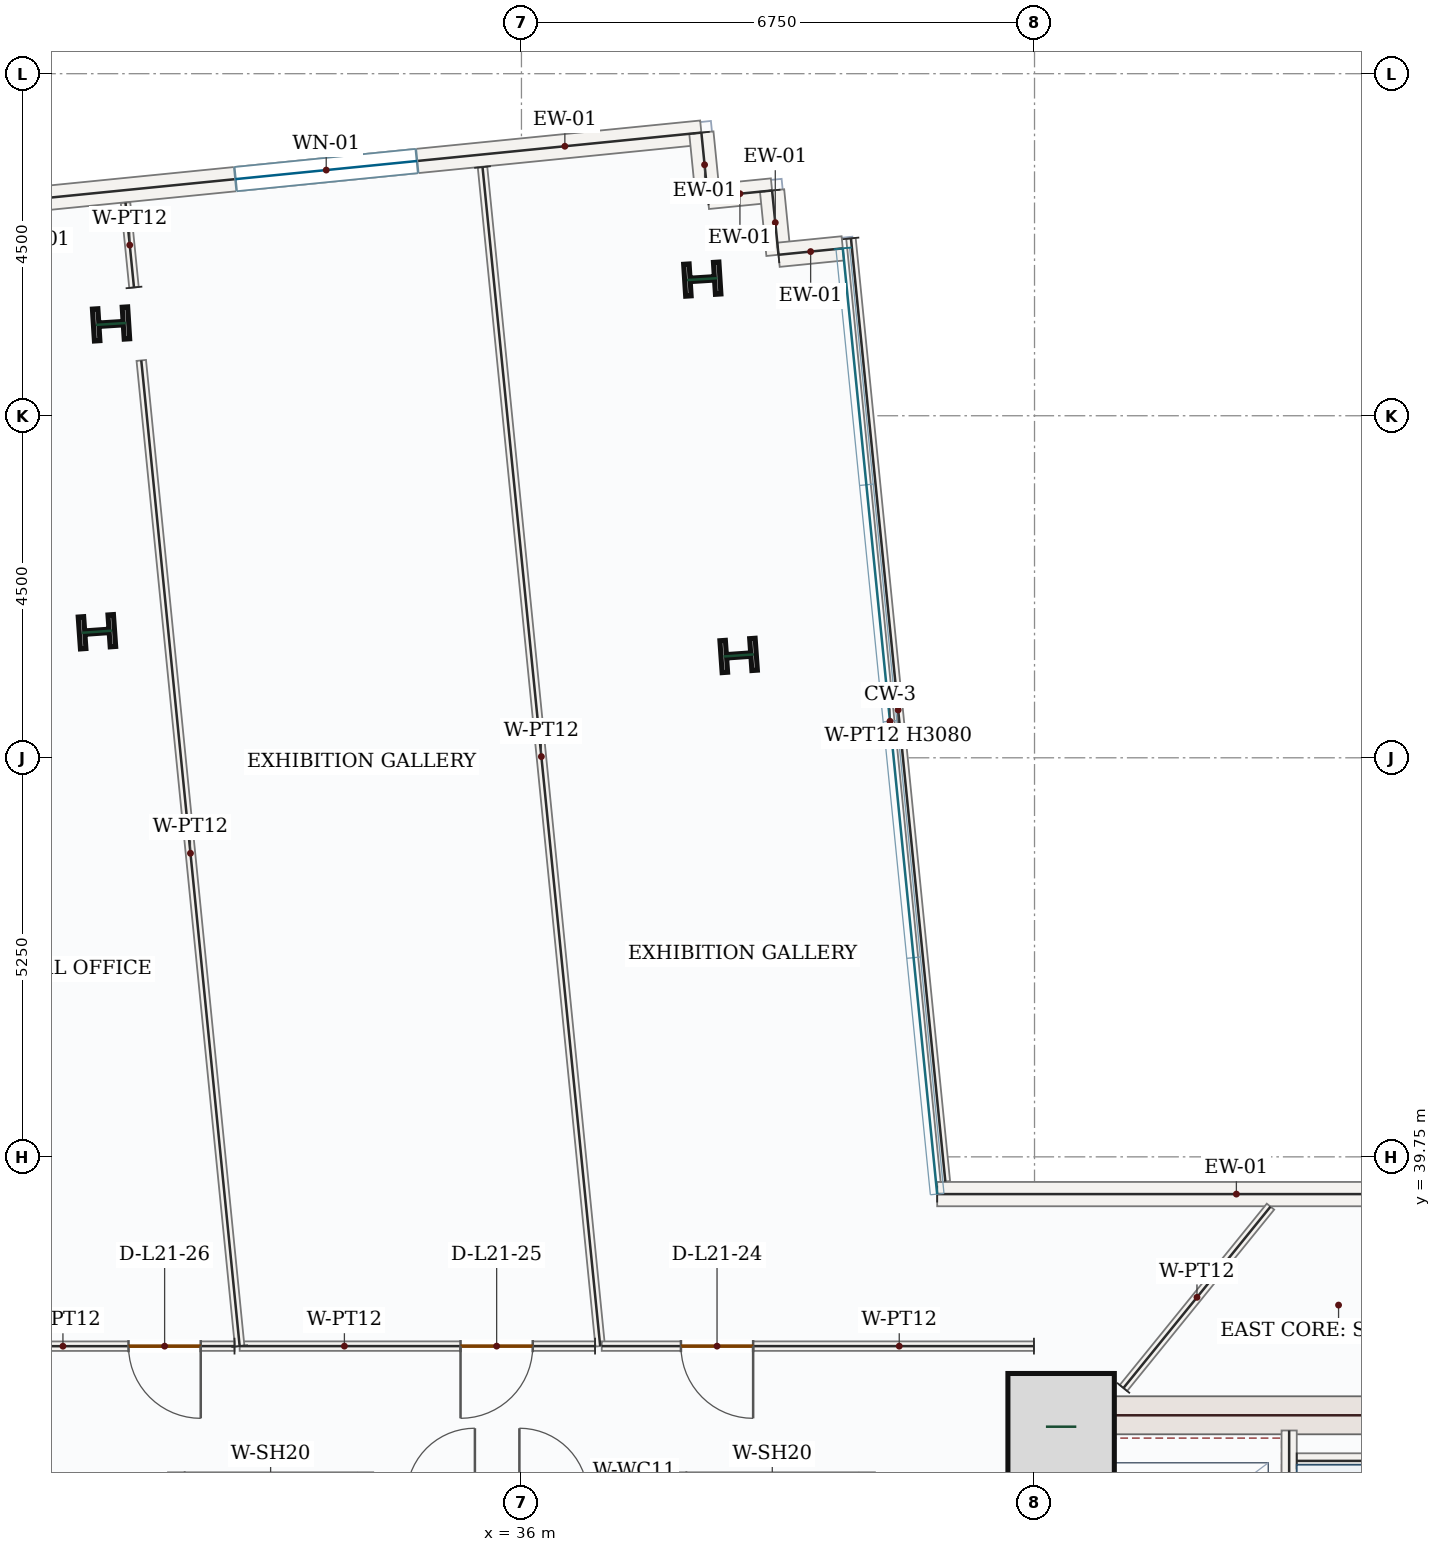
"""IFC4 building model, lengths in metres.
Left out: names, types, materials, properties, quantities, classifications, styles, units other than length and angle.
Written with IfcOpenShell. Run it as: python <this file> out.ifc"""

import sys

from ifc_helpers import new_model, si_unit, direction, frame, frame_2d, origin, origin_2d, place, context, subcontext, project, spatial, rectangle, i_section, extrude, source, transform, mapped, element, fill, save


model = new_model("IFC4")
c1 = context("Model", 3, precision=1e-05, world=origin(), true_north=direction((0.0, 1.0)))
c2 = subcontext(c1, "Body", "Model", "MODEL_VIEW")
j1 = project(units=[si_unit("LENGTHUNIT", "METRE"), si_unit("PLANEANGLEUNIT", "RADIAN")], contexts=[c1])
p1 = place(None, origin())
s1 = spatial("IfcSite", under=j1, at=p1, CompositionType="ELEMENT")
p2 = place(p1, origin())
s2 = spatial("IfcBuilding", under=s1, at=p2, CompositionType="ELEMENT")
p3 = place(p2, frame((0.0, 0.0, 96.3)))
s3 = spatial("IfcBuildingStorey", under=s2, at=p3, CompositionType="ELEMENT", Elevation=96.3)
p4 = place(p3, frame((43.0, 28.05, 0.0), z_axis=(0.0, 0.0, 1.0), x_axis=(0.0, 1.0, 0.0)))
e1 = element("IfcWall", 1, at=p4, inside=s3, PredefinedType="SHEAR", context=c2, shape_type="SweptSolid", body=[
    extrude(rectangle(XDim=8.55, YDim=0.5, at=frame_2d((4.275, 0.0))), origin(), (0.0, 0.0, 1.0), 3.95),
])
p5 = place(p4, frame((1.5, 0.0, 0.0)))
e2 = element("IfcOpeningElement", 2, at=p5, cuts=e1, PredefinedType="OPENING", context=c2, shape_type="SweptSolid", body=[
    extrude(rectangle(XDim=1.1, YDim=2.2, at=frame_2d((0.55, 1.1))), frame((0.0, 0.26, 0.0), z_axis=(0.0, -1.0, 0.0), x_axis=(1.0, 0.0, 0.0)), (0.0, 0.0, 1.0), 0.52),
])
m1 = source(origin(), c2, "Body", "SweptSolid", [
    extrude(rectangle(XDim=7.0, YDim=0.5, at=frame_2d((3.5, 0.0))), origin(), (0.0, 0.0, 1.0), 3.95),
])
p6 = place(p3, frame((43.25, 36.35, 0.0), z_axis=(0.0, 0.0, 1.0), x_axis=(1.0, 0.0, 0.0)))
e3 = element("IfcWall", 3, at=p6, inside=s3, PredefinedType="SHEAR", context=c2, shape_type="MappedRepresentation", body=[
    mapped(m1, transform((0.0, 0.0, 0.0), x_axis=(1.0, 0.0, 0.0), y_axis=(0.0, 1.0, 0.0), z_axis=(0.0, 0.0, 1.0), scale=1.0)),
])
m2 = source(origin(), c2, "Body", "SweptSolid", [
    extrude(rectangle(XDim=1.4, YDim=1.4, at=origin_2d()), origin(), (0.0, 0.0, 1.0), 4.2),
])
p7 = place(p3, frame((43.1, 36.2, 0.0), z_axis=(0.0, 0.0, 1.0), x_axis=(1.0, 0.0, 0.0)))
e4 = element("IfcColumn", 4, at=p7, inside=s3, PredefinedType="COLUMN", context=c2, shape_type="MappedRepresentation", body=[
    mapped(m2, transform((0.0, 0.0, 0.0), x_axis=(1.0, 0.0, 0.0), y_axis=(0.0, 1.0, 0.0), z_axis=(0.0, 0.0, 1.0), scale=1.0)),
])
m3 = source(origin(), c2, "Body", "SweptSolid", [
    extrude(i_section(OverallWidth=0.421, OverallDepth=0.465, WebThickness=0.045, FlangeThickness=0.073, FilletRadius=0.018, at=origin_2d()), origin(), (0.0, 0.0, 1.0), 4.2),
])
for number, where, z_axis, x_axis in (
    (5, (38.857, 46.346, 0.0), (0.0, 0.0, 1.0), (-0.07, 0.998, 0.0)),
    (6, (30.415, 46.658, 0.0), (0.0, 0.0, 1.0), (-0.07, 0.998, 0.0)),
    (7, (38.379, 51.297, 0.0), (0.0, 0.0, 1.0), (-0.063, 0.998, 0.0)),
    (8, (30.601, 50.708, 0.0), (0.0, 0.0, 1.0), (-0.063, 0.998, 0.0)),
):
    element("IfcColumn", number, at=place(p3, frame(where, z_axis=z_axis, x_axis=x_axis)), inside=s3, PredefinedType="COLUMN", context=c2, shape_type="MappedRepresentation", body=[
        mapped(m3, transform((0.0, 0.0, 0.0), x_axis=(1.0, 0.0, 0.0), y_axis=(0.0, 1.0, 0.0), z_axis=(0.0, 0.0, 1.0), scale=1.0)),
    ])
p8 = place(p3, frame((28.496, 52.24, 0.0), z_axis=(0.0, 0.0, 1.0), x_axis=(0.995054718915, 0.09932827576, 0.0)))
e9 = element("IfcWall", 9, at=p8, inside=s3, PredefinedType="SOLIDWALL", context=c2, shape_type="SweptSolid", body=[
    extrude(rectangle(XDim=9.92, YDim=0.32, at=frame_2d((4.96, 0.0))), origin(), (0.0, 0.0, 1.0), 3.95),
])
p9 = place(p8, frame((3.76, 0.0, 0.85)))
e10 = element("IfcOpeningElement", 10, at=p9, cuts=e9, PredefinedType="OPENING", context=c2, shape_type="SweptSolid", body=[
    extrude(rectangle(XDim=2.4, YDim=1.8, at=frame_2d((1.2, 0.9))), frame((0.0, 0.17, 0.0), z_axis=(0.0, -1.0, 0.0), x_axis=(1.0, 0.0, 0.0)), (0.0, 0.0, 1.0), 0.34),
])
m4 = source(origin(), c2, "Body", "SweptSolid", [
    extrude(rectangle(XDim=0.85, YDim=0.32, at=frame_2d((0.425, 0.0))), origin(), (0.0, 0.0, 1.0), 3.95),
])
for number, where, z_axis, x_axis in (
    (11, (38.367, 53.225, 0.0), (0.0, 0.0, 1.0), (0.099, -0.995, 0.0)),
    (12, (38.451, 52.379, 0.0), (0.0, 0.0, 1.0), (0.995, 0.099, 0.0)),
):
    element("IfcWall", number, at=place(p3, frame(where, z_axis=z_axis, x_axis=x_axis)), inside=s3, PredefinedType="SOLIDWALL", context=c2, shape_type="MappedRepresentation", body=[
        mapped(m4, transform((0.0, 0.0, 0.0), x_axis=(1.0, 0.0, 0.0), y_axis=(0.0, 1.0, 0.0), z_axis=(0.0, 0.0, 1.0), scale=1.0)),
    ])
m5 = source(origin(), c2, "Body", "SweptSolid", [
    extrude(rectangle(XDim=0.85, YDim=0.32, at=frame_2d((0.425, 0.0))), origin(), (0.0, 0.0, 1.0), 3.95),
])
p10 = place(p3, frame((39.297, 52.463, 0.0), z_axis=(0.0, 0.0, 1.0), x_axis=(0.099105525559, -0.995076929088, 0.0)))
e13 = element("IfcWall", 13, at=p10, inside=s3, PredefinedType="SOLIDWALL", context=c2, shape_type="MappedRepresentation", body=[
    mapped(m5, transform((0.0, 0.0, 0.0), x_axis=(1.0, 0.0, 0.0), y_axis=(0.0, 1.0, 0.0), z_axis=(0.0, 0.0, 1.0), scale=1.0)),
])
p11 = place(p3, frame((39.382, 51.618, 0.0), z_axis=(0.0, 0.0, 1.0), x_axis=(0.995079749343, 0.09907720448, 0.0)))
e14 = element("IfcWall", 14, at=p11, inside=s3, PredefinedType="SOLIDWALL", context=c2, shape_type="MappedRepresentation", body=[
    mapped(m4, transform((0.0, 0.0, 0.0), x_axis=(1.0, 0.0, 0.0), y_axis=(0.0, 1.0, 0.0), z_axis=(0.0, 0.0, 1.0), scale=1.0)),
])
m6 = source(origin(), c2, "Body", "SweptSolid", [
    extrude(rectangle(XDim=7.873, YDim=0.32, at=frame_2d((3.936, 0.0))), origin(), (0.0, 0.0, 1.0), 3.95),
])
p12 = place(p3, frame((41.469, 39.26, 0.0), z_axis=(0.0, 0.0, 1.0), x_axis=(1.0, 0.0, 0.0)))
e15 = element("IfcWall", 15, at=p12, inside=s3, PredefinedType="SOLIDWALL", context=c2, shape_type="MappedRepresentation", body=[
    mapped(m6, transform((0.0, 0.0, 0.0), x_axis=(1.0, 0.0, 0.0), y_axis=(0.0, 1.0, 0.0), z_axis=(0.0, 0.0, 1.0), scale=1.0)),
])
p13 = place(p3, frame((46.1, 28.15, 0.0), z_axis=(0.0, 0.0, 1.0), x_axis=(0.0, 1.0, 0.0)))
e16 = element("IfcWall", 16, at=p13, inside=s3, PredefinedType="SOLIDWALL", context=c2, shape_type="SweptSolid", body=[
    extrude(rectangle(XDim=8.0, YDim=0.2, at=frame_2d((4.0, 0.0))), origin(), (0.0, 0.0, 1.0), 3.95),
])
p14 = place(p13, frame((0.4, 0.0, 0.0)))
e17 = element("IfcOpeningElement", 17, at=p14, cuts=e16, PredefinedType="OPENING", context=c2, shape_type="SweptSolid", body=[
    extrude(rectangle(XDim=1.05, YDim=2.15, at=frame_2d((0.525, 1.075))), frame((0.0, 0.11, 0.0), z_axis=(0.0, -1.0, 0.0), x_axis=(1.0, 0.0, 0.0)), (0.0, 0.0, 1.0), 0.22),
])
m7 = source(origin(), c2, "Body", "SweptSolid", [
    extrude(rectangle(XDim=3.25, YDim=0.2, at=frame_2d((1.625, 0.0))), origin(), (0.0, 0.0, 1.0), 3.95),
])
p15 = place(p3, frame((46.2, 35.75, 0.0), z_axis=(0.0, 0.0, 1.0), x_axis=(1.0, 0.0, 0.0)))
e18 = element("IfcWall", 18, at=p15, inside=s3, PredefinedType="SOLIDWALL", context=c2, shape_type="MappedRepresentation", body=[
    mapped(m7, transform((0.0, 0.0, 0.0), x_axis=(1.0, 0.0, 0.0), y_axis=(0.0, 1.0, 0.0), z_axis=(0.0, 0.0, 1.0), scale=1.0)),
])
m8 = source(origin(), c2, "Body", "SweptSolid", [
    extrude(rectangle(XDim=2.4, YDim=0.2, at=frame_2d((1.2, 0.0))), origin(), (0.0, 0.0, 1.0), 3.95),
])
for number, where, z_axis, x_axis in (
    (19, (31.45, 33.2, 0.0), (0.0, 0.0, 1.0), (0.0, 1.0, 0.0)),
    (20, (33.95, 33.2, 0.0), (0.0, 0.0, 1.0), (0.0, 1.0, 0.0)),
    (21, (38.05, 33.2, 0.0), (0.0, 0.0, 1.0), (0.0, 1.0, 0.0)),
    (22, (40.55, 33.2, 0.0), (0.0, 0.0, 1.0), (0.0, 1.0, 0.0)),
):
    element("IfcWall", number, at=place(p3, frame(where, z_axis=z_axis, x_axis=x_axis)), inside=s3, PredefinedType="SOLIDWALL", context=c2, shape_type="MappedRepresentation", body=[
        mapped(m8, transform((0.0, 0.0, 0.0), x_axis=(1.0, 0.0, 0.0), y_axis=(0.0, 1.0, 0.0), z_axis=(0.0, 0.0, 1.0), scale=1.0)),
    ])
m9 = source(origin(), c2, "Body", "SweptSolid", [
    extrude(rectangle(XDim=3.072, YDim=0.125, at=frame_2d((1.536, 0.0))), origin(), (0.0, 0.0, 1.0), 3.95),
])
p16 = place(p3, frame((43.92, 36.709, 0.0), z_axis=(0.0, 0.0, 1.0), x_axis=(0.629760486176, 0.776789373029, 0.0)))
e23 = element("IfcWall", 23, at=p16, inside=s3, PredefinedType="PARTITIONING", context=c2, shape_type="MappedRepresentation", body=[
    mapped(m9, transform((0.0, 0.0, 0.0), x_axis=(1.0, 0.0, 0.0), y_axis=(0.0, 1.0, 0.0), z_axis=(0.0, 0.0, 1.0), scale=1.0)),
])
m10 = source(origin(), c2, "Body", "SweptSolid", [
    extrude(rectangle(XDim=15.589, YDim=0.125, at=frame_2d((7.794, 0.0))), origin(), (0.0, 0.0, 1.0), 3.95),
])
p17 = place(p3, frame((35.488, 52.771, 0.0), z_axis=(0.0, 0.0, 1.0), x_axis=(0.099325393126, -0.995055006661, 0.0)))
e24 = element("IfcWall", 24, at=p17, inside=s3, PredefinedType="PARTITIONING", context=c2, shape_type="MappedRepresentation", body=[
    mapped(m10, transform((0.0, 0.0, 0.0), x_axis=(1.0, 0.0, 0.0), y_axis=(0.0, 1.0, 0.0), z_axis=(0.0, 0.0, 1.0), scale=1.0)),
])
p18 = place(p3, frame((36.968, 37.26, 0.0), z_axis=(0.0, 0.0, 1.0), x_axis=(-1.0, 0.0, 0.0)))
e25 = element("IfcWall", 25, at=p18, inside=s3, PredefinedType="PARTITIONING", context=c2, shape_type="SweptSolid", body=[
    extrude(rectangle(XDim=4.676, YDim=0.125, at=frame_2d((2.338, 0.0))), origin(), (0.0, 0.0, 1.0), 3.95),
])
p19 = place(p18, frame((0.82, 0.0, 0.0)))
e26 = element("IfcOpeningElement", 26, at=p19, cuts=e25, PredefinedType="OPENING", context=c2, shape_type="SweptSolid", body=[
    extrude(rectangle(XDim=0.95, YDim=2.15, at=frame_2d((0.475, 1.075))), frame((0.0, 0.073, 0.0), z_axis=(0.0, -1.0, 0.0), x_axis=(1.0, 0.0, 0.0)), (0.0, 0.0, 1.0), 0.145),
])
m11 = source(origin(), c2, "Body", "SweptSolid", [
    extrude(rectangle(XDim=13.032, YDim=0.125, at=frame_2d((6.516, 0.0))), origin(), (0.0, 0.0, 1.0), 3.95),
])
p20 = place(p3, frame((32.293, 37.26, 0.0), z_axis=(0.0, 0.0, 1.0), x_axis=(-0.099325655293, 0.995054980491, 0.0)))
e27 = element("IfcWall", 27, at=p20, inside=s3, PredefinedType="PARTITIONING", context=c2, shape_type="MappedRepresentation", body=[
    mapped(m11, transform((0.0, 0.0, 0.0), x_axis=(1.0, 0.0, 0.0), y_axis=(0.0, 1.0, 0.0), z_axis=(0.0, 0.0, 1.0), scale=1.0)),
])
m12 = source(origin(), c2, "Body", "SweptSolid", [
    extrude(rectangle(XDim=1.121, YDim=0.125, at=frame_2d((0.56, 0.0))), origin(), (0.0, 0.0, 1.0), 3.95),
])
p21 = place(p3, frame((30.902, 51.188, 0.0), z_axis=(0.0, 0.0, 1.0), x_axis=(-0.099352712797, 0.99505227926, 0.0)))
e28 = element("IfcWall", 28, at=p21, inside=s3, PredefinedType="PARTITIONING", context=c2, shape_type="MappedRepresentation", body=[
    mapped(m12, transform((0.0, 0.0, 0.0), x_axis=(1.0, 0.0, 0.0), y_axis=(0.0, 1.0, 0.0), z_axis=(0.0, 0.0, 1.0), scale=1.0)),
])
p22 = place(p3, frame((32.225, 37.26, 0.0), z_axis=(0.0, 0.0, 1.0), x_axis=(-0.999999915533, -0.000411015173, 0.0)))
e29 = element("IfcWall", 29, at=p22, inside=s3, PredefinedType="PARTITIONING", context=c2, shape_type="SweptSolid", body=[
    extrude(rectangle(XDim=2.97, YDim=0.125, at=frame_2d((1.485, 0.0))), origin(), (0.0, 0.0, 1.0), 3.95),
])
p23 = place(p22, frame((0.444, 0.0, 0.0)))
e30 = element("IfcOpeningElement", 30, at=p23, cuts=e29, PredefinedType="OPENING", context=c2, shape_type="SweptSolid", body=[
    extrude(rectangle(XDim=0.95, YDim=2.15, at=frame_2d((0.475, 1.075))), frame((0.0, 0.073, 0.0), z_axis=(0.0, -1.0, 0.0), x_axis=(1.0, 0.0, 0.0)), (0.0, 0.0, 1.0), 0.145),
])
p24 = place(p3, frame((42.742, 37.26, 0.0), z_axis=(0.0, 0.0, 1.0), x_axis=(-0.999999999078, 4.2935039e-05, 0.0)))
e31 = element("IfcWall", 31, at=p24, inside=s3, PredefinedType="PARTITIONING", context=c2, shape_type="SweptSolid", body=[
    extrude(rectangle(XDim=5.686, YDim=0.125, at=frame_2d((2.843, 0.0))), origin(), (0.0, 0.0, 1.0), 3.95),
])
p25 = place(p24, frame((3.694, 0.0, 0.0)))
e32 = element("IfcOpeningElement", 32, at=p25, cuts=e31, PredefinedType="OPENING", context=c2, shape_type="SweptSolid", body=[
    extrude(rectangle(XDim=0.95, YDim=2.15, at=frame_2d((0.475, 1.075))), frame((0.0, 0.073, 0.0), z_axis=(0.0, -1.0, 0.0), x_axis=(1.0, 0.0, 0.0)), (0.0, 0.0, 1.0), 0.145),
])
m13 = source(origin(), c2, "Body", "SweptSolid", [
    extrude(rectangle(XDim=12.47, YDim=0.125, at=frame_2d((6.235, 0.0))), origin(), (0.0, 0.0, 1.0), 3.08),
])
p26 = place(p3, frame((40.335, 51.833, 0.0), z_axis=(0.0, 0.0, 1.0), x_axis=(0.099590945301, -0.99502846372, 0.0)))
e33 = element("IfcWall", 33, at=p26, inside=s3, PredefinedType="PARTITIONING", context=c2, shape_type="MappedRepresentation", body=[
    mapped(m13, transform((0.0, 0.0, 0.0), x_axis=(1.0, 0.0, 0.0), y_axis=(0.0, 1.0, 0.0), z_axis=(0.0, 0.0, 1.0), scale=1.0)),
])
m14 = source(origin(), c2, "Body", "SweptSolid", [
    extrude(rectangle(XDim=2.4, YDim=1.8, at=frame_2d((1.2, 0.9))), frame((0.0, 0.03, 0.0), z_axis=(0.0, -1.0, 0.0), x_axis=(1.0, 0.0, 0.0)), (0.0, 0.0, 1.0), 0.06),
])
p27 = place(p9, origin())
e34 = element("IfcWindow", 34, at=p27, inside=s3, PartitioningType="DOUBLE_PANEL_VERTICAL", PredefinedType="WINDOW", context=c2, shape_type="MappedRepresentation", body=[
    mapped(m14, transform((0.0, 0.0, 0.0), x_axis=(1.0, 0.0, 0.0), y_axis=(0.0, 1.0, 0.0), z_axis=(0.0, 0.0, 1.0), scale=1.0)),
])
fill(e10, e34)
m15 = source(origin(), c2, "Body", "SweptSolid", [
    extrude(rectangle(XDim=0.95, YDim=2.15, at=frame_2d((0.475, 1.075))), frame((0.0, 0.025, 0.0), z_axis=(0.0, -1.0, 0.0), x_axis=(1.0, 0.0, 0.0)), (0.0, 0.0, 1.0), 0.05),
])
p28 = place(p25, origin())
e35 = element("IfcDoor", 35, at=p28, inside=s3, OperationType="SINGLE_SWING_LEFT", PredefinedType="DOOR", context=c2, shape_type="MappedRepresentation", body=[
    mapped(m15, transform((0.0, 0.0, 0.0), x_axis=(1.0, 0.0, 0.0), y_axis=(0.0, 1.0, 0.0), z_axis=(0.0, 0.0, 1.0), scale=1.0)),
])
fill(e32, e35)
p29 = place(p19, origin())
e36 = element("IfcDoor", 36, at=p29, inside=s3, OperationType="SINGLE_SWING_RIGHT", PredefinedType="DOOR", context=c2, shape_type="MappedRepresentation", body=[
    mapped(m15, transform((0.0, 0.0, 0.0), x_axis=(1.0, 0.0, 0.0), y_axis=(0.0, 1.0, 0.0), z_axis=(0.0, 0.0, 1.0), scale=1.0)),
])
fill(e26, e36)
p30 = place(p23, origin())
e37 = element("IfcDoor", 37, at=p30, inside=s3, OperationType="SINGLE_SWING_LEFT", PredefinedType="DOOR", context=c2, shape_type="MappedRepresentation", body=[
    mapped(m15, transform((0.0, 0.0, 0.0), x_axis=(1.0, 0.0, 0.0), y_axis=(0.0, 1.0, 0.0), z_axis=(0.0, 0.0, 1.0), scale=1.0)),
])
fill(e30, e37)
save(model, sys.argv[1])
